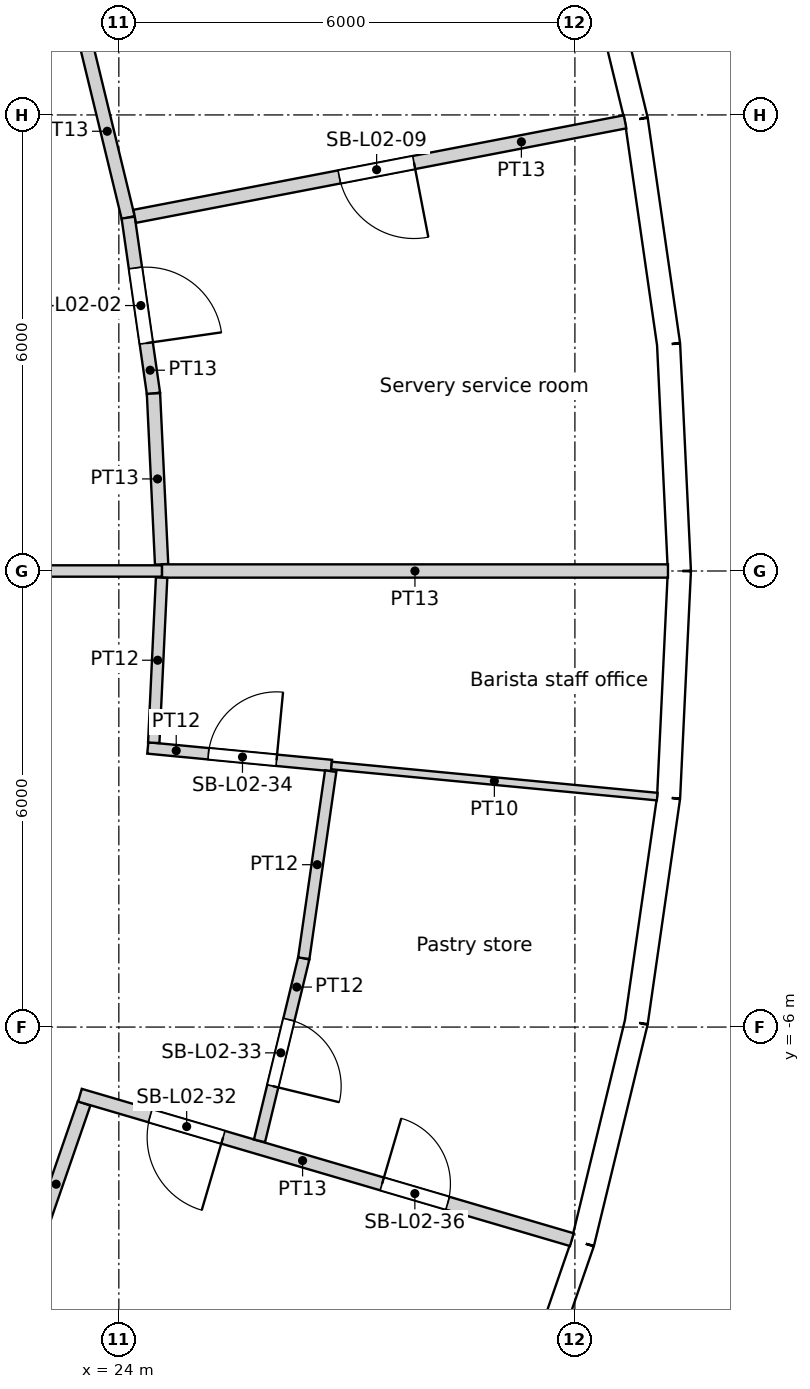
"""IFC4 building model, lengths in metres.
Left out: names, types, materials, properties, quantities, classifications, styles, units other than length and angle.
Written with IfcOpenShell. Run it as: python <this file> out.ifc"""

import sys

from ifc_helpers import new_model, si_unit, direction, frame, frame_2d, origin, origin_2d, place, context, subcontext, project, spatial, rectangle, circle, extrude, element, fill, save


model = new_model("IFC4")
c1 = context("Model", 3, precision=1e-05, world=origin(), true_north=direction((0.0, 1.0)))
c2 = subcontext(c1, "Body", "Model", "MODEL_VIEW")
j1 = project(units=[si_unit("LENGTHUNIT", "METRE"), si_unit("PLANEANGLEUNIT", "RADIAN")], contexts=[c1])
p1 = place(None, origin())
s1 = spatial("IfcSite", under=j1, at=p1, CompositionType="ELEMENT")
p2 = place(p1, origin())
s2 = spatial("IfcBuilding", under=s1, at=p2, CompositionType="ELEMENT")
p3 = place(p2, frame((0.0, 0.0, 13.8)))
s3 = spatial("IfcBuildingStorey", under=s2, at=p3, CompositionType="ELEMENT", Elevation=13.8)
for number, where, z_axis, x_axis in (
    (1, (30.275, 0.0, 0.0), (0.0, 0.0, 1.0), (1.0, 0.0, 0.0)),
    (2, (29.728, 5.729, 0.0), (0.0, 0.0, 1.0), (1.0, 0.0, 0.0)),
    (3, (29.728, -5.729, 0.0), (0.0, 0.0, 1.0), (1.0, 0.0, 0.0)),
):
    element("IfcColumn", number, at=place(p3, frame(where, z_axis=z_axis, x_axis=x_axis)), inside=s3, PredefinedType="COLUMN", context=c2, shape_type="SweptSolid", body=[
        extrude(circle(Radius=0.7, at=origin_2d()), origin(), (0.0, 0.0, 1.0), 4.8),
    ])
for number, where, z_axis, x_axis in (
    (4, (24.548, 0.0, 0.0), (0.0, 0.0, 1.0), (1.0, 0.0, 0.0)),
    (5, (23.886, 5.661, 0.0), (0.0, 0.0, 1.0), (1.0, 0.0, 0.0)),
    (6, (23.886, -5.661, 0.0), (0.0, 0.0, 1.0), (1.0, 0.0, 0.0)),
):
    element("IfcColumn", number, at=place(p3, frame(where, z_axis=z_axis, x_axis=x_axis)), inside=s3, PredefinedType="COLUMN", context=c2, shape_type="SweptSolid", body=[
        extrude(circle(Radius=0.75, at=origin_2d()), origin(), (0.0, 0.0, 1.0), 4.8),
    ])
p4 = place(p3, frame((31.375, 0.0, 0.0), z_axis=(0.0, 0.0, 1.0), x_axis=(-0.047588458579, 0.998867027492, 0.0)))
e7 = element("IfcWall", 7, at=p4, inside=s3, PredefinedType="SOLIDWALL", context=c2, shape_type="SweptSolid", body=[
    extrude(rectangle(XDim=2.986, YDim=0.3, at=frame_2d((1.493, 0.0))), origin(), (0.0, 0.0, 1.0), 4.35),
])
p5 = place(p4, frame((1.493, 0.0, 2.0)))
e8 = element("IfcOpeningElement", 8, at=p5, cuts=e7, PredefinedType="OPENING", context=c2, shape_type="SweptSolid", body=[
    extrude(circle(Radius=1.2, at=origin_2d()), frame((0.0, 0.16, 0.0), z_axis=(0.0, -1.0, 0.0), x_axis=(1.0, 0.0, 0.0)), (0.0, 0.0, 1.0), 0.32),
])
p6 = place(p3, frame((31.232, 2.982, 0.0), z_axis=(0.0, 0.0, 1.0), x_axis=(-0.142360001917, 0.989814947278, 0.0)))
e9 = element("IfcWall", 9, at=p6, inside=s3, PredefinedType="SOLIDWALL", context=c2, shape_type="SweptSolid", body=[
    extrude(rectangle(XDim=2.986, YDim=0.3, at=frame_2d((1.493, 0.0))), origin(), (0.0, 0.0, 1.0), 4.35),
])
p7 = place(p6, frame((1.493, 0.0, 2.0)))
e10 = element("IfcOpeningElement", 10, at=p7, cuts=e9, PredefinedType="OPENING", context=c2, shape_type="SweptSolid", body=[
    extrude(circle(Radius=1.2, at=origin_2d()), frame((0.0, 0.16, 0.0), z_axis=(0.0, -1.0, 0.0), x_axis=(1.0, 0.0, 0.0)), (0.0, 0.0, 1.0), 0.32),
])
p8 = place(p3, frame((30.807, 5.938, 0.0), z_axis=(0.0, 0.0, 1.0), x_axis=(-0.235756834479, 0.971812078026, 0.0)))
e11 = element("IfcWall", 11, at=p8, inside=s3, PredefinedType="SOLIDWALL", context=c2, shape_type="SweptSolid", body=[
    extrude(rectangle(XDim=2.986, YDim=0.3, at=frame_2d((1.493, 0.0))), origin(), (0.0, 0.0, 1.0), 4.35),
])
p9 = place(p8, frame((1.493, 0.0, 2.0)))
e12 = element("IfcOpeningElement", 12, at=p9, cuts=e11, PredefinedType="OPENING", context=c2, shape_type="SweptSolid", body=[
    extrude(circle(Radius=1.2, at=origin_2d()), frame((0.0, 0.16, 0.0), z_axis=(0.0, -1.0, 0.0), x_axis=(1.0, 0.0, 0.0)), (0.0, 0.0, 1.0), 0.32),
])
p10 = place(p3, frame((29.127, -11.661, 0.0), z_axis=(0.0, 0.0, 1.0), x_axis=(0.327074054052, 0.944998710669, 0.0)))
e13 = element("IfcWall", 13, at=p10, inside=s3, PredefinedType="SOLIDWALL", context=c2, shape_type="SweptSolid", body=[
    extrude(rectangle(XDim=2.986, YDim=0.3, at=frame_2d((1.493, 0.0))), origin(), (0.0, 0.0, 1.0), 4.35),
])
p11 = place(p10, frame((1.493, 0.0, 2.0)))
e14 = element("IfcOpeningElement", 14, at=p11, cuts=e13, PredefinedType="OPENING", context=c2, shape_type="SweptSolid", body=[
    extrude(circle(Radius=1.2, at=origin_2d()), frame((0.0, 0.16, 0.0), z_axis=(0.0, -1.0, 0.0), x_axis=(1.0, 0.0, 0.0)), (0.0, 0.0, 1.0), 0.32),
])
p12 = place(p3, frame((30.104, -8.839, 0.0), z_axis=(0.0, 0.0, 1.0), x_axis=(0.235756834479, 0.971812078026, 0.0)))
e15 = element("IfcWall", 15, at=p12, inside=s3, PredefinedType="SOLIDWALL", context=c2, shape_type="SweptSolid", body=[
    extrude(rectangle(XDim=2.986, YDim=0.3, at=frame_2d((1.493, 0.0))), origin(), (0.0, 0.0, 1.0), 4.35),
])
p13 = place(p12, frame((1.493, 0.0, 2.0)))
e16 = element("IfcOpeningElement", 16, at=p13, cuts=e15, PredefinedType="OPENING", context=c2, shape_type="SweptSolid", body=[
    extrude(circle(Radius=1.2, at=origin_2d()), frame((0.0, 0.16, 0.0), z_axis=(0.0, -1.0, 0.0), x_axis=(1.0, 0.0, 0.0)), (0.0, 0.0, 1.0), 0.32),
])
p14 = place(p3, frame((30.807, -5.938, 0.0), z_axis=(0.0, 0.0, 1.0), x_axis=(0.142360001917, 0.989814947278, 0.0)))
e17 = element("IfcWall", 17, at=p14, inside=s3, PredefinedType="SOLIDWALL", context=c2, shape_type="SweptSolid", body=[
    extrude(rectangle(XDim=2.986, YDim=0.3, at=frame_2d((1.493, 0.0))), origin(), (0.0, 0.0, 1.0), 4.35),
])
p15 = place(p14, frame((1.493, 0.0, 2.0)))
e18 = element("IfcOpeningElement", 18, at=p15, cuts=e17, PredefinedType="OPENING", context=c2, shape_type="SweptSolid", body=[
    extrude(circle(Radius=1.2, at=origin_2d()), frame((0.0, 0.16, 0.0), z_axis=(0.0, -1.0, 0.0), x_axis=(1.0, 0.0, 0.0)), (0.0, 0.0, 1.0), 0.32),
])
p16 = place(p3, frame((31.232, -2.982, 0.0), z_axis=(0.0, 0.0, 1.0), x_axis=(0.047588458579, 0.998867027492, 0.0)))
e19 = element("IfcWall", 19, at=p16, inside=s3, PredefinedType="SOLIDWALL", context=c2, shape_type="SweptSolid", body=[
    extrude(rectangle(XDim=2.986, YDim=0.3, at=frame_2d((1.493, 0.0))), origin(), (0.0, 0.0, 1.0), 4.35),
])
p17 = place(p16, frame((1.493, 0.0, 2.0)))
e20 = element("IfcOpeningElement", 20, at=p17, cuts=e19, PredefinedType="OPENING", context=c2, shape_type="SweptSolid", body=[
    extrude(circle(Radius=1.2, at=origin_2d()), frame((0.0, 0.16, 0.0), z_axis=(0.0, -1.0, 0.0), x_axis=(1.0, 0.0, 0.0)), (0.0, 0.0, 1.0), 0.32),
])
p18 = place(p3, frame((22.807, -9.131, 0.0), z_axis=(0.0, 0.0, 1.0), x_axis=(0.327077029882, 0.944997680697, 0.0)))
e21 = element("IfcWall", 21, at=p18, inside=s3, PredefinedType="PARTITIONING", context=c2, shape_type="SweptSolid", body=[
    extrude(rectangle(XDim=2.25, YDim=0.175, at=frame_2d((1.125, 0.0))), origin(), (0.0, 0.0, 1.0), 3.75),
])
p19 = place(p3, frame((24.123, 4.649, 0.0), z_axis=(0.0, 0.0, 1.0), x_axis=(-0.235821214509, 0.971796457489, 0.0)))
e22 = element("IfcWall", 22, at=p19, inside=s3, PredefinedType="PARTITIONING", context=c2, shape_type="SweptSolid", body=[
    extrude(rectangle(XDim=2.338, YDim=0.175, at=frame_2d((1.169, 0.0))), origin(), (0.0, 0.0, 1.0), 3.75),
])
p20 = place(p3, frame((24.459, -2.26, 0.0), z_axis=(0.0, 0.0, 1.0), x_axis=(0.047586478613, 0.99886712182, 0.0)))
e23 = element("IfcWall", 23, at=p20, inside=s3, PredefinedType="PARTITIONING", context=c2, shape_type="SweptSolid", body=[
    extrude(rectangle(XDim=2.175, YDim=0.15, at=frame_2d((1.088, 0.0))), origin(), (0.0, 0.0, 1.0), 3.75),
])
p21 = place(p3, frame((24.123, 4.649, 0.0), z_axis=(0.0, 0.0, 1.0), x_axis=(0.142327683086, -0.989819594991, 0.0)))
e24 = element("IfcWall", 24, at=p21, inside=s3, PredefinedType="PARTITIONING", context=c2, shape_type="SweptSolid", body=[
    extrude(rectangle(XDim=2.338, YDim=0.175, at=frame_2d((1.169, 0.0))), origin(), (0.0, 0.0, 1.0), 3.75),
])
p22 = place(p21, frame((0.669, 0.0, 0.0)))
e25 = element("IfcOpeningElement", 25, at=p22, cuts=e24, PredefinedType="OPENING", context=c2, shape_type="SweptSolid", body=[
    extrude(rectangle(XDim=1.0, YDim=2.1, at=frame_2d((0.5, 1.05))), frame((0.0, 0.087, 0.0), z_axis=(0.0, -1.0, 0.0), x_axis=(1.0, 0.0, 0.0)), (0.0, 0.0, 1.0), 0.175),
])
p23 = place(p3, frame((24.567, 0.0, 0.0), z_axis=(0.0, 0.0, 1.0), x_axis=(-1.0, 0.0, 0.0)))
e26 = element("IfcWall", 26, at=p23, inside=s3, PredefinedType="PARTITIONING", context=c2, shape_type="SweptSolid", body=[
    extrude(rectangle(XDim=8.242, YDim=0.15, at=frame_2d((4.121, 0.0))), origin(), (0.0, 0.0, 1.0), 3.75),
])
p24 = place(p3, frame((24.562, 0.087, 0.0), z_axis=(0.0, 0.0, 1.0), x_axis=(-0.047518758708, 0.998870345726, 0.0)))
e27 = element("IfcWall", 27, at=p24, inside=s3, PredefinedType="PARTITIONING", context=c2, shape_type="SweptSolid", body=[
    extrude(rectangle(XDim=2.25, YDim=0.175, at=frame_2d((1.125, 0.0))), origin(), (0.0, 0.0, 1.0), 3.75),
])
p25 = place(p3, frame((26.433, -5.094, 0.0), z_axis=(0.0, 0.0, 1.0), x_axis=(-0.235698938428, -0.971826121497, 0.0)))
e28 = element("IfcWall", 28, at=p25, inside=s3, PredefinedType="PARTITIONING", context=c2, shape_type="SweptSolid", body=[
    extrude(rectangle(XDim=2.472, YDim=0.15, at=frame_2d((1.236, 0.0))), origin(), (0.0, 0.0, 1.0), 3.75),
])
p26 = place(p25, frame((0.831, 0.0, 0.0)))
e29 = element("IfcOpeningElement", 29, at=p26, cuts=e28, PredefinedType="OPENING", context=c2, shape_type="SweptSolid", body=[
    extrude(rectangle(XDim=0.9, YDim=2.1, at=frame_2d((0.45, 1.05))), frame((0.0, 0.075, 0.0), z_axis=(0.0, -1.0, 0.0), x_axis=(1.0, 0.0, 0.0)), (0.0, 0.0, 1.0), 0.15),
])
p27 = place(p3, frame((26.433, -5.094, 0.0), z_axis=(0.0, 0.0, 1.0), x_axis=(0.142369768544, 0.989813542545, 0.0)))
e30 = element("IfcWall", 30, at=p27, inside=s3, PredefinedType="PARTITIONING", context=c2, shape_type="SweptSolid", body=[
    extrude(rectangle(XDim=2.487, YDim=0.15, at=frame_2d((1.243, 0.0))), origin(), (0.0, 0.0, 1.0), 3.75),
])
p28 = place(p3, frame((24.381, -2.328, 0.0), z_axis=(0.0, 0.0, 1.0), x_axis=(0.995474205062, -0.095032136962, 0.0)))
e31 = element("IfcWall", 31, at=p28, inside=s3, PredefinedType="PARTITIONING", context=c2, shape_type="SweptSolid", body=[
    extrude(rectangle(XDim=2.428, YDim=0.15, at=frame_2d((1.214, 0.0))), origin(), (0.0, 0.0, 1.0), 3.75),
])
p29 = place(p28, frame((0.802, 0.0, 0.0)))
e32 = element("IfcOpeningElement", 32, at=p29, cuts=e31, PredefinedType="OPENING", context=c2, shape_type="SweptSolid", body=[
    extrude(rectangle(XDim=0.9, YDim=2.1, at=frame_2d((0.45, 1.05))), frame((0.0, 0.075, 0.0), z_axis=(0.0, -1.0, 0.0), x_axis=(1.0, 0.0, 0.0)), (0.0, 0.0, 1.0), 0.15),
])
p30 = place(p3, frame((29.959, -8.797, 0.0), z_axis=(0.0, 0.0, 1.0), x_axis=(-0.959490475678, 0.281741063891, 0.0)))
e33 = element("IfcWall", 33, at=p30, inside=s3, PredefinedType="PARTITIONING", context=c2, shape_type="SweptSolid", body=[
    extrude(rectangle(XDim=6.745, YDim=0.175, at=frame_2d((3.373, 0.0))), origin(), (0.0, 0.0, 1.0), 3.75),
])
p31 = place(p30, frame((4.781, 0.0, 0.0)))
e34 = element("IfcOpeningElement", 34, at=p31, cuts=e33, PredefinedType="OPENING", context=c2, shape_type="SweptSolid", body=[
    extrude(rectangle(XDim=1.0, YDim=2.1, at=frame_2d((0.5, 1.05))), frame((0.0, 0.087, 0.0), z_axis=(0.0, -1.0, 0.0), x_axis=(1.0, 0.0, 0.0)), (0.0, 0.0, 1.0), 0.175),
])
p32 = place(p30, frame((1.702, 0.0, 0.0)))
e35 = element("IfcOpeningElement", 35, at=p32, cuts=e33, PredefinedType="OPENING", context=c2, shape_type="SweptSolid", body=[
    extrude(rectangle(XDim=0.9, YDim=2.1, at=frame_2d((0.45, 1.05))), frame((0.0, 0.087, 0.0), z_axis=(0.0, -1.0, 0.0), x_axis=(1.0, 0.0, 0.0)), (0.0, 0.0, 1.0), 0.175),
])
p33 = place(p3, frame((30.66, 5.909, 0.0), z_axis=(0.0, 0.0, 1.0), x_axis=(-0.981934280486, -0.189222273548, 0.0)))
e36 = element("IfcWall", 36, at=p33, inside=s3, PredefinedType="PARTITIONING", context=c2, shape_type="SweptSolid", body=[
    extrude(rectangle(XDim=6.57, YDim=0.175, at=frame_2d((3.285, 0.0))), origin(), (0.0, 0.0, 1.0), 3.75),
])
p34 = place(p33, frame((2.829, 0.0, 0.0)))
e37 = element("IfcOpeningElement", 37, at=p34, cuts=e36, PredefinedType="OPENING", context=c2, shape_type="SweptSolid", body=[
    extrude(rectangle(XDim=1.0, YDim=2.1, at=frame_2d((0.5, 1.05))), frame((0.0, 0.087, 0.0), z_axis=(0.0, -1.0, 0.0), x_axis=(1.0, 0.0, 0.0)), (0.0, 0.0, 1.0), 0.175),
])
p35 = place(p3, frame((31.083, -2.968, 0.0), z_axis=(0.0, 0.0, 1.0), x_axis=(-0.995472503613, 0.095049958187, 0.0)))
e38 = element("IfcWall", 38, at=p35, inside=s3, PredefinedType="PARTITIONING", context=c2, shape_type="SweptSolid", body=[
    extrude(rectangle(XDim=4.305, YDim=0.1, at=frame_2d((2.152, 0.0))), origin(), (0.0, 0.0, 1.0), 3.75),
])
p36 = place(p3, frame((31.224, 0.0, 0.0), z_axis=(0.0, 0.0, 1.0), x_axis=(-1.0, 0.0, 0.0)))
e39 = element("IfcWall", 39, at=p36, inside=s3, PredefinedType="PARTITIONING", context=c2, shape_type="SweptSolid", body=[
    extrude(rectangle(XDim=6.658, YDim=0.175, at=frame_2d((3.329, 0.0))), origin(), (0.0, 0.0, 1.0), 3.75),
])
p37 = place(p5, origin())
e40 = element("IfcWindow", 40, at=p37, inside=s3, PartitioningType="SINGLE_PANEL", PredefinedType="WINDOW", context=c2, shape_type="SweptSolid", body=[
    extrude(circle(Radius=1.2, at=origin_2d()), frame((0.0, 0.12, 0.0), z_axis=(0.0, -1.0, 0.0), x_axis=(1.0, 0.0, 0.0)), (0.0, 0.0, 1.0), 0.1),
])
fill(e8, e40)
p38 = place(p7, origin())
e41 = element("IfcWindow", 41, at=p38, inside=s3, PartitioningType="SINGLE_PANEL", PredefinedType="WINDOW", context=c2, shape_type="SweptSolid", body=[
    extrude(circle(Radius=1.2, at=origin_2d()), frame((0.0, 0.12, 0.0), z_axis=(0.0, -1.0, 0.0), x_axis=(1.0, 0.0, 0.0)), (0.0, 0.0, 1.0), 0.1),
])
fill(e10, e41)
p39 = place(p9, origin())
e42 = element("IfcWindow", 42, at=p39, inside=s3, PartitioningType="SINGLE_PANEL", PredefinedType="WINDOW", context=c2, shape_type="SweptSolid", body=[
    extrude(circle(Radius=1.2, at=origin_2d()), frame((0.0, 0.12, 0.0), z_axis=(0.0, -1.0, 0.0), x_axis=(1.0, 0.0, 0.0)), (0.0, 0.0, 1.0), 0.1),
])
fill(e12, e42)
p40 = place(p11, origin())
e43 = element("IfcWindow", 43, at=p40, inside=s3, PartitioningType="SINGLE_PANEL", PredefinedType="WINDOW", context=c2, shape_type="SweptSolid", body=[
    extrude(circle(Radius=1.2, at=origin_2d()), frame((0.0, 0.12, 0.0), z_axis=(0.0, -1.0, 0.0), x_axis=(1.0, 0.0, 0.0)), (0.0, 0.0, 1.0), 0.1),
])
fill(e14, e43)
p41 = place(p13, origin())
e44 = element("IfcWindow", 44, at=p41, inside=s3, PartitioningType="SINGLE_PANEL", PredefinedType="WINDOW", context=c2, shape_type="SweptSolid", body=[
    extrude(circle(Radius=1.2, at=origin_2d()), frame((0.0, 0.12, 0.0), z_axis=(0.0, -1.0, 0.0), x_axis=(1.0, 0.0, 0.0)), (0.0, 0.0, 1.0), 0.1),
])
fill(e16, e44)
p42 = place(p15, origin())
e45 = element("IfcWindow", 45, at=p42, inside=s3, PartitioningType="SINGLE_PANEL", PredefinedType="WINDOW", context=c2, shape_type="SweptSolid", body=[
    extrude(circle(Radius=1.2, at=origin_2d()), frame((0.0, 0.12, 0.0), z_axis=(0.0, -1.0, 0.0), x_axis=(1.0, 0.0, 0.0)), (0.0, 0.0, 1.0), 0.1),
])
fill(e18, e45)
p43 = place(p17, origin())
e46 = element("IfcWindow", 46, at=p43, inside=s3, PartitioningType="SINGLE_PANEL", PredefinedType="WINDOW", context=c2, shape_type="SweptSolid", body=[
    extrude(circle(Radius=1.2, at=origin_2d()), frame((0.0, 0.12, 0.0), z_axis=(0.0, -1.0, 0.0), x_axis=(1.0, 0.0, 0.0)), (0.0, 0.0, 1.0), 0.1),
])
fill(e20, e46)
p44 = place(p22, origin())
e47 = element("IfcDoor", 47, at=p44, inside=s3, OperationType="SINGLE_SWING_RIGHT", PredefinedType="DOOR", context=c2, shape_type="SweptSolid", body=[
    extrude(rectangle(XDim=1.0, YDim=2.1, at=frame_2d((0.5, 1.05))), frame((0.0, 0.025, 0.0), z_axis=(0.0, -1.0, 0.0), x_axis=(1.0, 0.0, 0.0)), (0.0, 0.0, 1.0), 0.05),
])
fill(e25, e47)
p45 = place(p34, origin())
e48 = element("IfcDoor", 48, at=p45, inside=s3, OperationType="SINGLE_SWING_LEFT", PredefinedType="DOOR", context=c2, shape_type="SweptSolid", body=[
    extrude(rectangle(XDim=1.0, YDim=2.1, at=frame_2d((0.5, 1.05))), frame((0.0, 0.025, 0.0), z_axis=(0.0, -1.0, 0.0), x_axis=(1.0, 0.0, 0.0)), (0.0, 0.0, 1.0), 0.05),
])
fill(e37, e48)
p46 = place(p31, origin())
e49 = element("IfcDoor", 49, at=p46, inside=s3, OperationType="SINGLE_SWING_LEFT", PredefinedType="DOOR", context=c2, shape_type="SweptSolid", body=[
    extrude(rectangle(XDim=1.0, YDim=2.1, at=frame_2d((0.5, 1.05))), frame((0.0, 0.025, 0.0), z_axis=(0.0, -1.0, 0.0), x_axis=(1.0, 0.0, 0.0)), (0.0, 0.0, 1.0), 0.05),
])
fill(e34, e49)
p47 = place(p26, origin())
e50 = element("IfcDoor", 50, at=p47, inside=s3, OperationType="SINGLE_SWING_RIGHT", PredefinedType="DOOR", context=c2, shape_type="SweptSolid", body=[
    extrude(rectangle(XDim=0.9, YDim=2.1, at=frame_2d((0.45, 1.05))), frame((0.0, 0.025, 0.0), z_axis=(0.0, -1.0, 0.0), x_axis=(1.0, 0.0, 0.0)), (0.0, 0.0, 1.0), 0.05),
])
fill(e29, e50)
p48 = place(p29, origin())
e51 = element("IfcDoor", 51, at=p48, inside=s3, OperationType="SINGLE_SWING_RIGHT", PredefinedType="DOOR", context=c2, shape_type="SweptSolid", body=[
    extrude(rectangle(XDim=0.9, YDim=2.1, at=frame_2d((0.45, 1.05))), frame((0.0, 0.025, 0.0), z_axis=(0.0, -1.0, 0.0), x_axis=(1.0, 0.0, 0.0)), (0.0, 0.0, 1.0), 0.05),
])
fill(e32, e51)
p49 = place(p32, origin())
e52 = element("IfcDoor", 52, at=p49, inside=s3, OperationType="SINGLE_SWING_LEFT", PredefinedType="DOOR", context=c2, shape_type="SweptSolid", body=[
    extrude(rectangle(XDim=0.9, YDim=2.1, at=frame_2d((0.45, 1.05))), frame((0.0, 0.025, 0.0), z_axis=(0.0, -1.0, 0.0), x_axis=(1.0, 0.0, 0.0)), (0.0, 0.0, 1.0), 0.05),
])
fill(e35, e52)
save(model, sys.argv[1])
